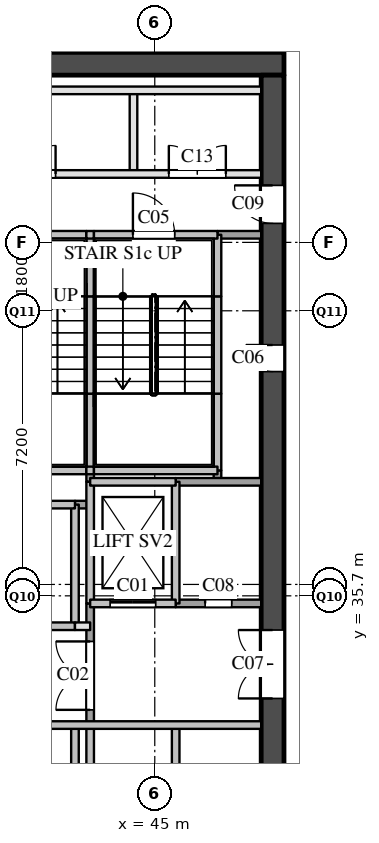
"""IFC4 building model, lengths in metres.
Left out: names, types, materials, properties, quantities, classifications, styles, units other than length and angle.
Written with IfcOpenShell. Run it as: python <this file> out.ifc"""

import sys

from ifc_helpers import new_model, si_unit, direction, frame, frame_2d, origin, place, context, subcontext, project, spatial, rectangle, extrude, element, fill, save


model = new_model("IFC4")
c1 = context("Model", 3, precision=1e-05, world=origin(), true_north=direction((0.0, 1.0)))
c2 = subcontext(c1, "Body", "Model", "MODEL_VIEW")
j1 = project(units=[si_unit("LENGTHUNIT", "METRE"), si_unit("PLANEANGLEUNIT", "RADIAN")], contexts=[c1])
p1 = place(None, origin())
s1 = spatial("IfcSite", under=j1, at=p1, CompositionType="ELEMENT")
p2 = place(p1, origin())
s2 = spatial("IfcBuilding", under=s1, at=p2, CompositionType="ELEMENT")
p3 = place(p2, frame((0.0, 0.0, -6.0)))
s3 = spatial("IfcBuildingStorey", under=s2, at=p3, CompositionType="ELEMENT", Elevation=-6.0)
p4 = place(p3, frame((36.0, 49.7, 0.0), z_axis=(0.0, 0.0, 1.0), x_axis=(1.0, 0.0, 0.0)))
e1 = element("IfcWall", 1, at=p4, inside=s3, PredefinedType="SHEAR", context=c2, shape_type="SweptSolid", body=[
    extrude(rectangle(XDim=12.4, YDim=0.6, at=frame_2d((6.2, 0.0))), origin(), (0.0, 0.0, 1.0), 5.59),
])
p5 = place(p3, frame((48.1, 29.1, 0.0), z_axis=(0.0, 0.0, 1.0), x_axis=(0.0, 1.0, 0.0)))
e2 = element("IfcWall", 2, at=p5, inside=s3, PredefinedType="SHEAR", context=c2, shape_type="SweptSolid", body=[
    extrude(rectangle(XDim=20.3, YDim=0.6, at=frame_2d((10.15, 0.0))), origin(), (0.0, 0.0, 1.0), 5.59),
])
p6 = place(p5, frame((12.5, 0.0, 0.0)))
e3 = element("IfcOpeningElement", 3, at=p6, cuts=e2, PredefinedType="OPENING", context=c2, shape_type="SweptSolid", body=[
    extrude(rectangle(XDim=0.7, YDim=2.1, at=frame_2d((0.35, 1.05))), frame((0.0, 0.31, 0.0), z_axis=(0.0, -1.0, 0.0), x_axis=(1.0, 0.0, 0.0)), (0.0, 0.0, 1.0), 0.62),
])
p7 = place(p5, frame((3.9, 0.0, 0.0)))
e4 = element("IfcOpeningElement", 4, at=p7, cuts=e2, PredefinedType="OPENING", context=c2, shape_type="SweptSolid", body=[
    extrude(rectangle(XDim=1.8, YDim=2.1, at=frame_2d((0.9, 1.05))), frame((0.0, 0.31, 0.0), z_axis=(0.0, -1.0, 0.0), x_axis=(1.0, 0.0, 0.0)), (0.0, 0.0, 1.0), 0.62),
])
p8 = place(p5, frame((16.4, 0.0, 0.0)))
e5 = element("IfcOpeningElement", 5, at=p8, cuts=e2, PredefinedType="OPENING", context=c2, shape_type="SweptSolid", body=[
    extrude(rectangle(XDim=1.0, YDim=2.1, at=frame_2d((0.5, 1.05))), frame((0.0, 0.31, 0.0), z_axis=(0.0, -1.0, 0.0), x_axis=(1.0, 0.0, 0.0)), (0.0, 0.0, 1.0), 0.62),
])
p9 = place(p3, frame((42.9, 29.1, 0.0), z_axis=(0.0, 0.0, 1.0), x_axis=(0.0, 1.0, 0.0)))
e6 = element("IfcWall", 6, at=p9, inside=s3, PredefinedType="SOLIDWALL", context=c2, shape_type="SweptSolid", body=[
    extrude(rectangle(XDim=3.2, YDim=0.2, at=frame_2d((1.6, 0.0))), origin(), (0.0, 0.0, 1.0), 5.59),
])
p10 = place(p3, frame((42.9, 34.9, 0.0), z_axis=(0.0, 0.0, 1.0), x_axis=(0.0, 1.0, 0.0)))
e7 = element("IfcWall", 7, at=p10, inside=s3, PredefinedType="SOLIDWALL", context=c2, shape_type="SweptSolid", body=[
    extrude(rectangle(XDim=3.2, YDim=0.2, at=frame_2d((1.6, 0.0))), origin(), (0.0, 0.0, 1.0), 5.59),
])
for number, where, z_axis, x_axis in (
    (8, (43.3, 29.1, 0.0), (0.0, 0.0, 1.0), (0.0, 1.0, 0.0)),
    (9, (43.3, 35.5, 0.0), (0.0, 0.0, 1.0), (0.0, 1.0, 0.0)),
):
    element("IfcWall", number, at=place(p3, frame(where, z_axis=z_axis, x_axis=x_axis)), inside=s3, PredefinedType="SOLIDWALL", context=c2, shape_type="SweptSolid", body=[
        extrude(rectangle(XDim=3.2, YDim=0.2, at=frame_2d((1.6, 0.0))), origin(), (0.0, 0.0, 1.0), 5.59),
    ])
p11 = place(p3, frame((43.3, 32.3, 0.0), z_axis=(0.0, 0.0, 1.0), x_axis=(0.0, 1.0, 0.0)))
e10 = element("IfcWall", 10, at=p11, inside=s3, PredefinedType="SOLIDWALL", context=c2, shape_type="SweptSolid", body=[
    extrude(rectangle(XDim=3.2, YDim=0.2, at=frame_2d((1.6, 0.0))), origin(), (0.0, 0.0, 1.0), 5.59),
])
p12 = place(p11, frame((0.4, 0.0, 0.0)))
e11 = element("IfcOpeningElement", 11, at=p12, cuts=e10, PredefinedType="OPENING", context=c2, shape_type="SweptSolid", body=[
    extrude(rectangle(XDim=1.8, YDim=2.1, at=frame_2d((0.9, 1.05))), frame((0.0, 0.11, 0.0), z_axis=(0.0, -1.0, 0.0), x_axis=(1.0, 0.0, 0.0)), (0.0, 0.0, 1.0), 0.22),
])
p13 = place(p3, frame((43.3, 38.7, 0.0), z_axis=(0.0, 0.0, 1.0), x_axis=(0.0, 1.0, 0.0)))
e12 = element("IfcWall", 12, at=p13, inside=s3, PredefinedType="SOLIDWALL", context=c2, shape_type="SweptSolid", body=[
    extrude(rectangle(XDim=0.3, YDim=0.2, at=frame_2d((0.15, 0.0))), origin(), (0.0, 0.0, 1.0), 5.59),
])
p14 = place(p3, frame((43.3, 39.0, 0.0), z_axis=(0.0, 0.0, 1.0), x_axis=(0.0, 1.0, 0.0)))
e13 = element("IfcWall", 13, at=p14, inside=s3, PredefinedType="SOLIDWALL", context=c2, shape_type="SweptSolid", body=[
    extrude(rectangle(XDim=2.02, YDim=0.2, at=frame_2d((1.01, 0.0))), origin(), (0.0, 0.0, 1.0), 5.59),
])
p15 = place(p3, frame((43.3, 41.02, 0.0), z_axis=(0.0, 0.0, 1.0), x_axis=(0.0, 1.0, 0.0)))
e14 = element("IfcWall", 14, at=p15, inside=s3, PredefinedType="SOLIDWALL", context=c2, shape_type="SweptSolid", body=[
    extrude(rectangle(XDim=2.56, YDim=0.2, at=frame_2d((1.28, 0.0))), origin(), (0.0, 0.0, 1.0), 5.59),
])
p16 = place(p3, frame((43.3, 43.58, 0.0), z_axis=(0.0, 0.0, 1.0), x_axis=(0.0, 1.0, 0.0)))
e15 = element("IfcWall", 15, at=p16, inside=s3, PredefinedType="SOLIDWALL", context=c2, shape_type="SweptSolid", body=[
    extrude(rectangle(XDim=1.62, YDim=0.2, at=frame_2d((0.81, 0.0))), origin(), (0.0, 0.0, 1.0), 5.59),
])
p17 = place(p3, frame((44.44, 46.8, 0.0), z_axis=(0.0, 0.0, 1.0), x_axis=(0.0, 1.0, 0.0)))
e16 = element("IfcWall", 16, at=p17, inside=s3, PredefinedType="PARTITIONING", context=c2, shape_type="SweptSolid", body=[
    extrude(rectangle(XDim=2.2, YDim=0.2, at=frame_2d((1.1, 0.0))), origin(), (0.0, 0.0, 1.0), 5.59),
])
for number, where, z_axis, x_axis in (
    (17, (45.55, 29.1, 0.0), (0.0, 0.0, 1.0), (0.0, 1.0, 0.0)),
    (18, (45.55, 35.5, 0.0), (0.0, 0.0, 1.0), (0.0, 1.0, 0.0)),
):
    element("IfcWall", number, at=place(p3, frame(where, z_axis=z_axis, x_axis=x_axis)), inside=s3, PredefinedType="SOLIDWALL", context=c2, shape_type="SweptSolid", body=[
        extrude(rectangle(XDim=3.2, YDim=0.2, at=frame_2d((1.6, 0.0))), origin(), (0.0, 0.0, 1.0), 5.59),
    ])
p18 = place(p3, frame((46.65, 38.7, 0.0), z_axis=(0.0, 0.0, 1.0), x_axis=(0.0, 1.0, 0.0)))
e19 = element("IfcWall", 19, at=p18, inside=s3, PredefinedType="SOLIDWALL", context=c2, shape_type="SweptSolid", body=[
    extrude(rectangle(XDim=0.3, YDim=0.2, at=frame_2d((0.15, 0.0))), origin(), (0.0, 0.0, 1.0), 5.59),
])
p19 = place(p3, frame((46.65, 39.0, 0.0), z_axis=(0.0, 0.0, 1.0), x_axis=(0.0, 1.0, 0.0)))
e20 = element("IfcWall", 20, at=p19, inside=s3, PredefinedType="SOLIDWALL", context=c2, shape_type="SweptSolid", body=[
    extrude(rectangle(XDim=2.02, YDim=0.2, at=frame_2d((1.01, 0.0))), origin(), (0.0, 0.0, 1.0), 5.59),
])
p20 = place(p3, frame((46.65, 41.02, 0.0), z_axis=(0.0, 0.0, 1.0), x_axis=(0.0, 1.0, 0.0)))
e21 = element("IfcWall", 21, at=p20, inside=s3, PredefinedType="SOLIDWALL", context=c2, shape_type="SweptSolid", body=[
    extrude(rectangle(XDim=2.56, YDim=0.2, at=frame_2d((1.28, 0.0))), origin(), (0.0, 0.0, 1.0), 5.59),
])
p21 = place(p3, frame((46.65, 43.58, 0.0), z_axis=(0.0, 0.0, 1.0), x_axis=(0.0, 1.0, 0.0)))
e22 = element("IfcWall", 22, at=p21, inside=s3, PredefinedType="SOLIDWALL", context=c2, shape_type="SweptSolid", body=[
    extrude(rectangle(XDim=1.62, YDim=0.2, at=frame_2d((0.81, 0.0))), origin(), (0.0, 0.0, 1.0), 5.59),
])
p22 = place(p3, frame((36.6, 32.3, 0.0), z_axis=(0.0, 0.0, 1.0), x_axis=(1.0, 0.0, 0.0)))
e23 = element("IfcWall", 23, at=p22, inside=s3, PredefinedType="SOLIDWALL", context=c2, shape_type="SweptSolid", body=[
    extrude(rectangle(XDim=11.2, YDim=0.2, at=frame_2d((5.6, 0.0))), origin(), (0.0, 0.0, 1.0), 5.59),
])
p23 = place(p3, frame((42.9, 34.9, 0.0), z_axis=(0.0, 0.0, 1.0), x_axis=(1.0, 0.0, 0.0)))
e24 = element("IfcWall", 24, at=p23, inside=s3, PredefinedType="PARTITIONING", context=c2, shape_type="SweptSolid", body=[
    extrude(rectangle(XDim=0.4, YDim=0.2, at=frame_2d((0.2, 0.0))), origin(), (0.0, 0.0, 1.0), 5.59),
])
p24 = place(p3, frame((36.6, 34.9, 0.0), z_axis=(0.0, 0.0, 1.0), x_axis=(1.0, 0.0, 0.0)))
e25 = element("IfcWall", 25, at=p24, inside=s3, PredefinedType="SOLIDWALL", context=c2, shape_type="SweptSolid", body=[
    extrude(rectangle(XDim=6.3, YDim=0.2, at=frame_2d((3.15, 0.0))), origin(), (0.0, 0.0, 1.0), 5.59),
])
p25 = place(p3, frame((43.3, 35.5, 0.0), z_axis=(0.0, 0.0, 1.0), x_axis=(1.0, 0.0, 0.0)))
e26 = element("IfcWall", 26, at=p25, inside=s3, PredefinedType="SOLIDWALL", context=c2, shape_type="SweptSolid", body=[
    extrude(rectangle(XDim=2.25, YDim=0.2, at=frame_2d((1.125, 0.0))), origin(), (0.0, 0.0, 1.0), 5.59),
])
p26 = place(p25, frame((0.525, 0.0, 0.0)))
e27 = element("IfcOpeningElement", 27, at=p26, cuts=e26, PredefinedType="OPENING", context=c2, shape_type="SweptSolid", body=[
    extrude(rectangle(XDim=1.2, YDim=2.1, at=frame_2d((0.6, 1.05))), frame((0.0, 0.11, 0.0), z_axis=(0.0, -1.0, 0.0), x_axis=(1.0, 0.0, 0.0)), (0.0, 0.0, 1.0), 0.22),
])
p27 = place(p3, frame((45.55, 35.5, 0.0), z_axis=(0.0, 0.0, 1.0), x_axis=(1.0, 0.0, 0.0)))
e28 = element("IfcWall", 28, at=p27, inside=s3, PredefinedType="SOLIDWALL", context=c2, shape_type="SweptSolid", body=[
    extrude(rectangle(XDim=2.25, YDim=0.2, at=frame_2d((1.125, 0.0))), origin(), (0.0, 0.0, 1.0), 5.59),
])
p28 = place(p27, frame((0.775, 0.0, 0.0)))
e29 = element("IfcOpeningElement", 29, at=p28, cuts=e28, PredefinedType="OPENING", context=c2, shape_type="SweptSolid", body=[
    extrude(rectangle(XDim=0.7, YDim=2.1, at=frame_2d((0.35, 1.05))), frame((0.0, 0.11, 0.0), z_axis=(0.0, -1.0, 0.0), x_axis=(1.0, 0.0, 0.0)), (0.0, 0.0, 1.0), 0.22),
])
p29 = place(p3, frame((36.6, 38.1, 0.0), z_axis=(0.0, 0.0, 1.0), x_axis=(1.0, 0.0, 0.0)))
e30 = element("IfcWall", 30, at=p29, inside=s3, PredefinedType="SOLIDWALL", context=c2, shape_type="SweptSolid", body=[
    extrude(rectangle(XDim=6.3, YDim=0.2, at=frame_2d((3.15, 0.0))), origin(), (0.0, 0.0, 1.0), 5.59),
])
p30 = place(p3, frame((42.9, 38.1, 0.0), z_axis=(0.0, 0.0, 1.0), x_axis=(1.0, 0.0, 0.0)))
e31 = element("IfcWall", 31, at=p30, inside=s3, PredefinedType="SOLIDWALL", context=c2, shape_type="SweptSolid", body=[
    extrude(rectangle(XDim=0.4, YDim=0.2, at=frame_2d((0.2, 0.0))), origin(), (0.0, 0.0, 1.0), 5.59),
])
for number, where, z_axis, x_axis in (
    (32, (43.3, 38.7, 0.0), (0.0, 0.0, 1.0), (1.0, 0.0, 0.0)),
    (33, (45.55, 38.7, 0.0), (0.0, 0.0, 1.0), (1.0, 0.0, 0.0)),
):
    element("IfcWall", number, at=place(p3, frame(where, z_axis=z_axis, x_axis=x_axis)), inside=s3, PredefinedType="SOLIDWALL", context=c2, shape_type="SweptSolid", body=[
        extrude(rectangle(XDim=2.25, YDim=0.2, at=frame_2d((1.125, 0.0))), origin(), (0.0, 0.0, 1.0), 5.59),
    ])
p31 = place(p3, frame((40.05, 39.0, 0.0), z_axis=(0.0, 0.0, 1.0), x_axis=(1.0, 0.0, 0.0)))
e34 = element("IfcWall", 34, at=p31, inside=s3, PredefinedType="SOLIDWALL", context=c2, shape_type="SweptSolid", body=[
    extrude(rectangle(XDim=3.15, YDim=0.2, at=frame_2d((1.575, 0.0))), origin(), (0.0, 0.0, 1.0), 5.59),
])
p32 = place(p3, frame((43.2, 39.0, 0.0), z_axis=(0.0, 0.0, 1.0), x_axis=(1.0, 0.0, 0.0)))
e35 = element("IfcWall", 35, at=p32, inside=s3, PredefinedType="SOLIDWALL", context=c2, shape_type="SweptSolid", body=[
    extrude(rectangle(XDim=0.2, YDim=0.2, at=frame_2d((0.1, 0.0))), origin(), (0.0, 0.0, 1.0), 5.59),
])
p33 = place(p3, frame((43.4, 39.0, 0.0), z_axis=(0.0, 0.0, 1.0), x_axis=(1.0, 0.0, 0.0)))
e36 = element("IfcWall", 36, at=p33, inside=s3, PredefinedType="SOLIDWALL", context=c2, shape_type="SweptSolid", body=[
    extrude(rectangle(XDim=3.25, YDim=0.2, at=frame_2d((1.625, 0.0))), origin(), (0.0, 0.0, 1.0), 5.59),
])
p34 = place(p3, frame((46.65, 45.2, 0.0), z_axis=(0.0, 0.0, 1.0), x_axis=(1.0, 0.0, 0.0)))
e37 = element("IfcWall", 37, at=p34, inside=s3, PredefinedType="SOLIDWALL", context=c2, shape_type="SweptSolid", body=[
    extrude(rectangle(XDim=1.15, YDim=0.2, at=frame_2d((0.575, 0.0))), origin(), (0.0, 0.0, 1.0), 5.59),
])
p35 = place(p3, frame((40.05, 45.2, 0.0), z_axis=(0.0, 0.0, 1.0), x_axis=(1.0, 0.0, 0.0)))
e38 = element("IfcWall", 38, at=p35, inside=s3, PredefinedType="SOLIDWALL", context=c2, shape_type="SweptSolid", body=[
    extrude(rectangle(XDim=3.15, YDim=0.2, at=frame_2d((1.575, 0.0))), origin(), (0.0, 0.0, 1.0), 5.59),
])
p36 = place(p35, frame((1.025, 0.0, 0.0)))
e39 = element("IfcOpeningElement", 39, at=p36, cuts=e38, PredefinedType="OPENING", context=c2, shape_type="SweptSolid", body=[
    extrude(rectangle(XDim=1.1, YDim=2.1, at=frame_2d((0.55, 1.05))), frame((0.0, 0.11, 0.0), z_axis=(0.0, -1.0, 0.0), x_axis=(1.0, 0.0, 0.0)), (0.0, 0.0, 1.0), 0.22),
])
p37 = place(p3, frame((43.2, 45.2, 0.0), z_axis=(0.0, 0.0, 1.0), x_axis=(1.0, 0.0, 0.0)))
e40 = element("IfcWall", 40, at=p37, inside=s3, PredefinedType="SOLIDWALL", context=c2, shape_type="SweptSolid", body=[
    extrude(rectangle(XDim=0.2, YDim=0.2, at=frame_2d((0.1, 0.0))), origin(), (0.0, 0.0, 1.0), 5.59),
])
p38 = place(p3, frame((43.4, 45.2, 0.0), z_axis=(0.0, 0.0, 1.0), x_axis=(1.0, 0.0, 0.0)))
e41 = element("IfcWall", 41, at=p38, inside=s3, PredefinedType="SOLIDWALL", context=c2, shape_type="SweptSolid", body=[
    extrude(rectangle(XDim=3.25, YDim=0.2, at=frame_2d((1.625, 0.0))), origin(), (0.0, 0.0, 1.0), 5.59),
])
p39 = place(p38, frame((1.025, 0.0, 0.0)))
e42 = element("IfcOpeningElement", 42, at=p39, cuts=e41, PredefinedType="OPENING", context=c2, shape_type="SweptSolid", body=[
    extrude(rectangle(XDim=1.1, YDim=2.1, at=frame_2d((0.55, 1.05))), frame((0.0, 0.11, 0.0), z_axis=(0.0, -1.0, 0.0), x_axis=(1.0, 0.0, 0.0)), (0.0, 0.0, 1.0), 0.22),
])
p40 = place(p3, frame((36.6, 46.8, 0.0), z_axis=(0.0, 0.0, 1.0), x_axis=(1.0, 0.0, 0.0)))
e43 = element("IfcWall", 43, at=p40, inside=s3, PredefinedType="PARTITIONING", context=c2, shape_type="SweptSolid", body=[
    extrude(rectangle(XDim=11.2, YDim=0.2, at=frame_2d((5.6, 0.0))), origin(), (0.0, 0.0, 1.0), 5.59),
])
p41 = place(p40, frame((0.37, 0.0, 0.0)))
e44 = element("IfcOpeningElement", 44, at=p41, cuts=e43, PredefinedType="OPENING", context=c2, shape_type="SweptSolid", body=[
    extrude(rectangle(XDim=1.5, YDim=2.1, at=frame_2d((0.75, 1.05))), frame((0.0, 0.11, 0.0), z_axis=(0.0, -1.0, 0.0), x_axis=(1.0, 0.0, 0.0)), (0.0, 0.0, 1.0), 0.22),
])
p42 = place(p40, frame((4.29, 0.0, 0.0)))
e45 = element("IfcOpeningElement", 45, at=p42, cuts=e43, PredefinedType="OPENING", context=c2, shape_type="SweptSolid", body=[
    extrude(rectangle(XDim=1.5, YDim=2.1, at=frame_2d((0.75, 1.05))), frame((0.0, 0.11, 0.0), z_axis=(0.0, -1.0, 0.0), x_axis=(1.0, 0.0, 0.0)), (0.0, 0.0, 1.0), 0.22),
])
p43 = place(p40, frame((8.77, 0.0, 0.0)))
e46 = element("IfcOpeningElement", 46, at=p43, cuts=e43, PredefinedType="OPENING", context=c2, shape_type="SweptSolid", body=[
    extrude(rectangle(XDim=1.5, YDim=2.1, at=frame_2d((0.75, 1.05))), frame((0.0, 0.11, 0.0), z_axis=(0.0, -1.0, 0.0), x_axis=(1.0, 0.0, 0.0)), (0.0, 0.0, 1.0), 0.22),
])
p44 = place(p3, frame((36.6, 49.0, 0.0), z_axis=(0.0, 0.0, 1.0), x_axis=(1.0, 0.0, 0.0)))
e47 = element("IfcWall", 47, at=p44, inside=s3, PredefinedType="PARTITIONING", context=c2, shape_type="SweptSolid", body=[
    extrude(rectangle(XDim=11.2, YDim=0.2, at=frame_2d((5.6, 0.0))), origin(), (0.0, 0.0, 1.0), 5.59),
])
p45 = place(p26, origin())
e48 = element("IfcDoor", 48, at=p45, inside=s3, OperationType="SLIDING_TO_LEFT", PredefinedType="DOOR", context=c2, shape_type="SweptSolid", body=[
    extrude(rectangle(XDim=1.2, YDim=2.1, at=frame_2d((0.6, 1.05))), frame((0.0, 0.025, 0.0), z_axis=(0.0, -1.0, 0.0), x_axis=(1.0, 0.0, 0.0)), (0.0, 0.0, 1.0), 0.05),
])
fill(e27, e48)
p46 = place(p12, origin())
e49 = element("IfcDoor", 49, at=p46, inside=s3, OperationType="DOUBLE_DOOR_SINGLE_SWING", PredefinedType="DOOR", context=c2, shape_type="SweptSolid", body=[
    extrude(rectangle(XDim=1.8, YDim=2.1, at=frame_2d((0.9, 1.05))), frame((0.0, 0.025, 0.0), z_axis=(0.0, -1.0, 0.0), x_axis=(1.0, 0.0, 0.0)), (0.0, 0.0, 1.0), 0.05),
])
fill(e11, e49)
p47 = place(p39, origin())
e50 = element("IfcDoor", 50, at=p47, inside=s3, OperationType="SINGLE_SWING_LEFT", PredefinedType="DOOR", context=c2, shape_type="SweptSolid", body=[
    extrude(rectangle(XDim=1.1, YDim=2.1, at=frame_2d((0.55, 1.05))), frame((0.0, 0.025, 0.0), z_axis=(0.0, -1.0, 0.0), x_axis=(1.0, 0.0, 0.0)), (0.0, 0.0, 1.0), 0.05),
])
fill(e42, e50)
p48 = place(p6, origin())
e51 = element("IfcDoor", 51, at=p48, inside=s3, OperationType="SINGLE_SWING_RIGHT", PredefinedType="DOOR", context=c2, shape_type="SweptSolid", body=[
    extrude(rectangle(XDim=0.7, YDim=2.1, at=frame_2d((0.35, 1.05))), frame((0.0, 0.025, 0.0), z_axis=(0.0, -1.0, 0.0), x_axis=(1.0, 0.0, 0.0)), (0.0, 0.0, 1.0), 0.05),
])
fill(e3, e51)
p49 = place(p7, origin())
e52 = element("IfcDoor", 52, at=p49, inside=s3, OperationType="DOUBLE_DOOR_SINGLE_SWING", PredefinedType="DOOR", context=c2, shape_type="SweptSolid", body=[
    extrude(rectangle(XDim=1.8, YDim=2.1, at=frame_2d((0.9, 1.05))), frame((0.0, 0.025, 0.0), z_axis=(0.0, -1.0, 0.0), x_axis=(1.0, 0.0, 0.0)), (0.0, 0.0, 1.0), 0.05),
])
fill(e4, e52)
p50 = place(p28, origin())
e53 = element("IfcDoor", 53, at=p50, inside=s3, OperationType="SINGLE_SWING_LEFT", PredefinedType="DOOR", context=c2, shape_type="SweptSolid", body=[
    extrude(rectangle(XDim=0.7, YDim=2.1, at=frame_2d((0.35, 1.05))), frame((0.0, 0.025, 0.0), z_axis=(0.0, -1.0, 0.0), x_axis=(1.0, 0.0, 0.0)), (0.0, 0.0, 1.0), 0.05),
])
fill(e29, e53)
p51 = place(p8, origin())
e54 = element("IfcDoor", 54, at=p51, inside=s3, OperationType="SINGLE_SWING_RIGHT", PredefinedType="DOOR", context=c2, shape_type="SweptSolid", body=[
    extrude(rectangle(XDim=1.0, YDim=2.1, at=frame_2d((0.5, 1.05))), frame((0.0, 0.025, 0.0), z_axis=(0.0, -1.0, 0.0), x_axis=(1.0, 0.0, 0.0)), (0.0, 0.0, 1.0), 0.05),
])
fill(e5, e54)
p52 = place(p42, origin())
e55 = element("IfcDoor", 55, at=p52, inside=s3, OperationType="DOUBLE_DOOR_SINGLE_SWING", PredefinedType="DOOR", context=c2, shape_type="SweptSolid", body=[
    extrude(rectangle(XDim=1.5, YDim=2.1, at=frame_2d((0.75, 1.05))), frame((0.0, 0.025, 0.0), z_axis=(0.0, -1.0, 0.0), x_axis=(1.0, 0.0, 0.0)), (0.0, 0.0, 1.0), 0.05),
])
fill(e45, e55)
p53 = place(p43, origin())
e56 = element("IfcDoor", 56, at=p53, inside=s3, OperationType="DOUBLE_DOOR_SINGLE_SWING", PredefinedType="DOOR", context=c2, shape_type="SweptSolid", body=[
    extrude(rectangle(XDim=1.5, YDim=2.1, at=frame_2d((0.75, 1.05))), frame((0.0, 0.025, 0.0), z_axis=(0.0, -1.0, 0.0), x_axis=(1.0, 0.0, 0.0)), (0.0, 0.0, 1.0), 0.05),
])
fill(e46, e56)
save(model, sys.argv[1])
